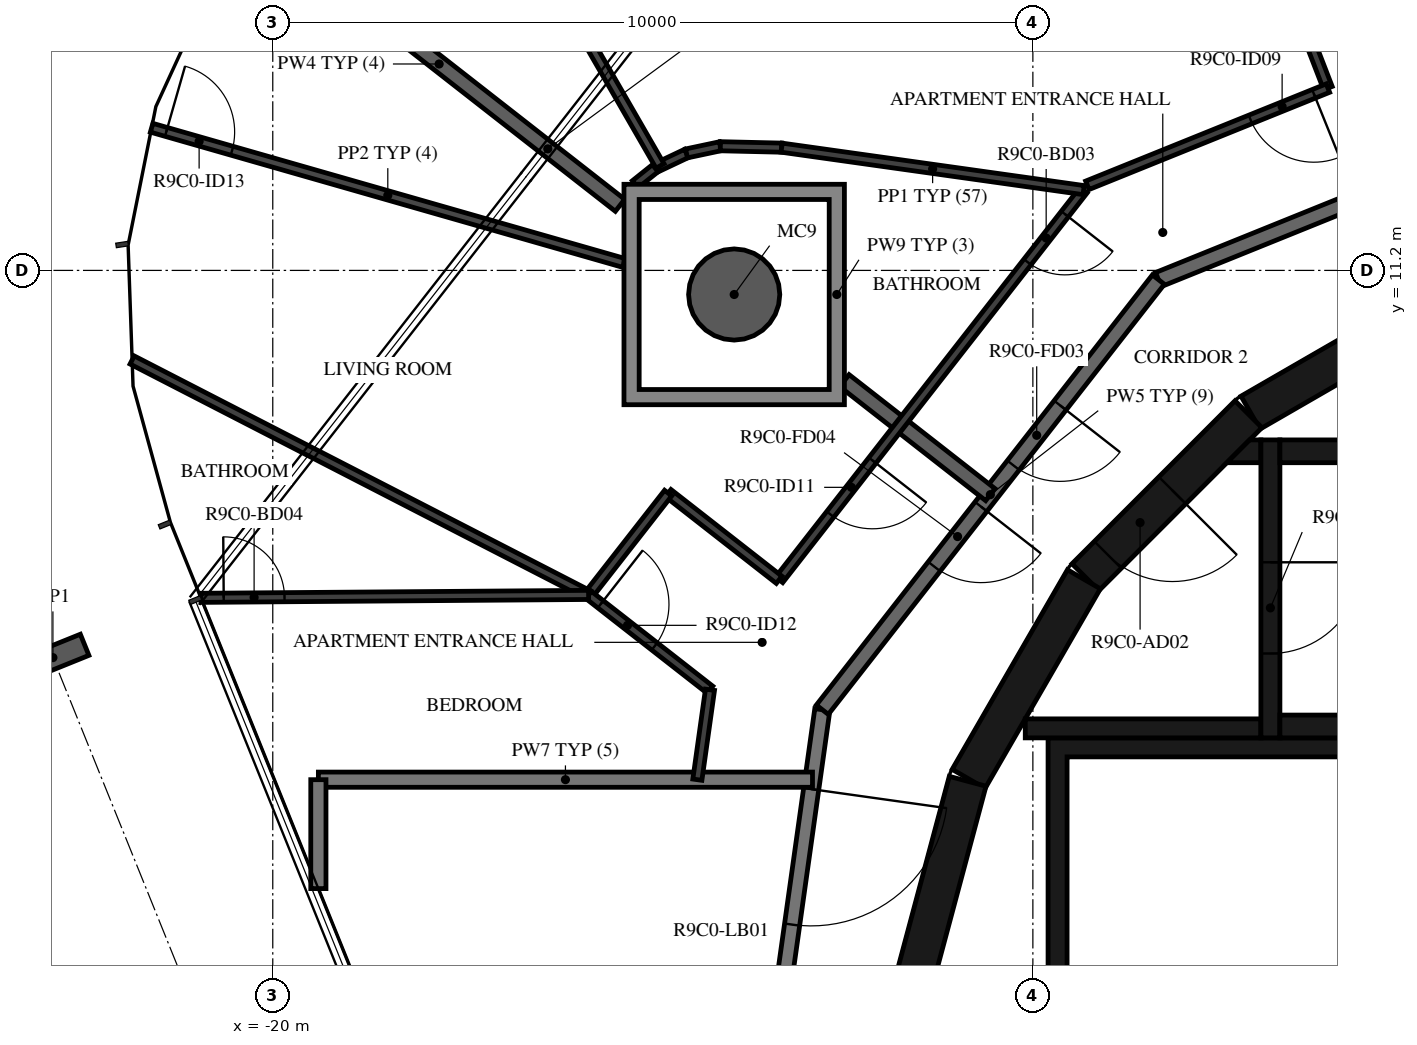
"""IFC4 building model, lengths in metres.
Left out: names, types, materials, properties, quantities, classifications, styles, units other than length and angle.
Written with IfcOpenShell. Run it as: python <this file> out.ifc"""

import sys

from ifc_helpers import new_model, si_unit, direction, frame, frame_2d, origin, origin_2d, place, context, subcontext, project, spatial, polyline, rectangle, hollow_circle, i_section, outline, extrude, element, fill, save


model = new_model("IFC4")
c1 = context("Model", 3, precision=1e-05, world=origin(), true_north=direction((0.0, 1.0)))
c2 = subcontext(c1, "Body", "Model", "MODEL_VIEW")
j1 = project(units=[si_unit("LENGTHUNIT", "METRE"), si_unit("PLANEANGLEUNIT", "RADIAN")], contexts=[c1])
p1 = place(None, origin())
s1 = spatial("IfcSite", under=j1, at=p1, CompositionType="ELEMENT")
p2 = place(p1, origin())
s2 = spatial("IfcBuilding", under=s1, at=p2, CompositionType="ELEMENT")
p3 = place(p2, frame((0.0, 0.0, 354.0)))
s3 = spatial("IfcBuildingStorey", under=s2, at=p3, CompositionType="ELEMENT", Elevation=354.0)
p4 = place(p3, frame((-13.929, 10.883, -0.38), z_axis=(0.0, 0.0, 1.0), x_axis=(1.0, 0.0, 0.0)))
e1 = element("IfcColumn", 1, at=p4, inside=s3, PredefinedType="COLUMN", context=c2, shape_type="SweptSolid", body=[
    extrude(hollow_circle(Radius=0.6, WallThickness=0.03, at=origin_2d()), origin(), (0.0, 0.0, 1.0), 3.5),
])
p5 = place(p3, frame((-22.893, 6.106, -0.38), z_axis=(0.0, 0.0, 1.0), x_axis=(-0.374606892434, 0.927183733755, 0.0)))
e2 = element("IfcColumn", 2, at=p5, inside=s3, PredefinedType="COLUMN", context=c2, shape_type="SweptSolid", body=[
    extrude(i_section(OverallWidth=0.3, OverallDepth=0.9, WebThickness=0.019, FlangeThickness=0.035, FilletRadius=0.03, at=origin_2d()), origin(), (0.0, 0.0, 1.0), 3.5),
])
p6 = place(p3, frame((-4.51, 10.845, 0.0), z_axis=(0.0, 0.0, 1.0), x_axis=(-0.865975092491, -0.500087131594, 0.0)))
e3 = element("IfcWall", 3, at=p6, inside=s3, PredefinedType="SHEAR", context=c2, shape_type="SweptSolid", body=[
    extrude(rectangle(XDim=3.033, YDim=0.5, at=frame_2d((1.516, 0.0))), origin(), (0.0, 0.0, 1.0), 3.12),
])
p7 = place(p3, frame((-7.164, 9.308, 0.0), z_axis=(0.0, 0.0, 1.0), x_axis=(-0.707106781187, -0.707106781187, 0.0)))
e4 = element("IfcWall", 4, at=p7, inside=s3, PredefinedType="SHEAR", context=c2, shape_type="SweptSolid", body=[
    extrude(rectangle(XDim=3.032, YDim=0.5, at=frame_2d((1.516, 0.0))), origin(), (0.0, 0.0, 1.0), 3.12),
])
p8 = place(p7, frame((1.416, 0.0, 0.0)))
e5 = element("IfcOpeningElement", 5, at=p8, cuts=e4, PredefinedType="OPENING", context=c2, shape_type="SweptSolid", body=[
    extrude(rectangle(XDim=1.2, YDim=2.1, at=frame_2d((0.6, 1.05))), frame((0.0, 0.26, 0.0), z_axis=(0.0, -1.0, 0.0), x_axis=(1.0, 0.0, 0.0)), (0.0, 0.0, 1.0), 0.52),
])
for number, where, z_axis, x_axis in (
    (6, (-9.329, 7.137, 0.0), (0.0, 0.0, 1.0), (-0.5, -0.866, 0.0)),
    (7, (-10.858, 4.479, 0.0), (0.0, 0.0, 1.0), (-0.259, -0.966, 0.0)),
):
    element("IfcWall", number, at=place(p3, frame(where, z_axis=z_axis, x_axis=x_axis)), inside=s3, PredefinedType="SHEAR", context=c2, shape_type="SweptSolid", body=[
        extrude(rectangle(XDim=3.033, YDim=0.5, at=frame_2d((1.516, 0.0))), origin(), (0.0, 0.0, 1.0), 3.12),
    ])
for number, where, z_axis, x_axis in (
    (8, (-6.75, 5.2, 0.0), (0.0, 0.0, 1.0), (1.0, 0.0, 0.0)),
    (9, (-6.75, 8.82, 0.0), (0.0, 0.0, 1.0), (1.0, 0.0, 0.0)),
):
    element("IfcWall", number, at=place(p3, frame(where, z_axis=z_axis, x_axis=x_axis)), inside=s3, PredefinedType="SHEAR", context=c2, shape_type="SweptSolid", body=[
        extrude(rectangle(XDim=6.75, YDim=0.3, at=frame_2d((3.375, 0.0))), origin(), (0.0, 0.0, 1.0), 3.12),
    ])
p9 = place(p3, frame((-6.875, 8.97, 0.0), z_axis=(0.0, 0.0, 1.0), x_axis=(0.0, -1.0, 0.0)))
e10 = element("IfcWall", 10, at=p9, inside=s3, PredefinedType="SHEAR", context=c2, shape_type="SweptSolid", body=[
    extrude(rectangle(XDim=3.92, YDim=0.25, at=frame_2d((1.96, 0.0))), origin(), (0.0, 0.0, 1.0), 3.12),
])
p10 = place(p9, frame((1.61, 0.0, 0.0)))
e11 = element("IfcOpeningElement", 11, at=p10, cuts=e10, PredefinedType="OPENING", context=c2, shape_type="SweptSolid", body=[
    extrude(rectangle(XDim=1.2, YDim=2.1, at=frame_2d((0.6, 1.05))), frame((0.0, 0.135, 0.0), z_axis=(0.0, -1.0, 0.0), x_axis=(1.0, 0.0, 0.0)), (0.0, 0.0, 1.0), 0.27),
])
p11 = place(p3, frame((-7.0, 5.175, 0.0), z_axis=(0.0, 0.0, 1.0), x_axis=(-1.0, 0.0, 0.0)))
e12 = element("IfcWall", 12, at=p11, inside=s3, PredefinedType="SHEAR", context=c2, shape_type="SweptSolid", body=[
    extrude(rectangle(XDim=3.1, YDim=0.25, at=frame_2d((1.55, 0.0))), origin(), (0.0, 0.0, 1.0), 3.12),
])
p12 = place(p3, origin())
e13 = element("IfcWall", 13, at=p12, inside=s3, PredefinedType="SHEAR", context=c2, shape_type="SweptSolid", body=[
    extrude(outline(polyline([(-7.148, 8.97), (-7.0, 8.97), (-7.0, 8.67), (-7.448, 8.67), (-7.148, 8.97)])), origin(), (0.0, 0.0, 1.0), 3.12),
])
p13 = place(p3, origin())
e14 = element("IfcWall", 14, at=p13, inside=s3, PredefinedType="SHEAR", context=c2, shape_type="SweptSolid", body=[
    extrude(outline(polyline([(-9.8, 1.9), (-9.55, 1.9), (-9.55, 4.8), (3.1, 4.8), (3.1, 1.9), (3.35, 1.9), (3.35, 4.8), (5.25, 4.8), (5.25, 1.9), (5.5, 1.9), (5.5, 4.8), (7.4, 4.8), (7.4, 1.9), (7.65, 1.9), (7.65, 4.8), (9.55, 4.8), (9.55, 1.9), (9.8, 1.9), (9.8, 4.8), (9.8, 5.05), (-9.8, 5.05), (-9.8, 4.8), (-9.8, 1.9)])), origin(), (0.0, 0.0, 1.0), 3.12),
])
p14 = place(p3, frame((-12.77, 5.42, 0.0), z_axis=(0.0, 0.0, 1.0), x_axis=(-0.139155334385, -0.990270565508, 0.0)))
e15 = element("IfcWall", 15, at=p14, inside=s3, PredefinedType="STANDARD", context=c2, shape_type="SweptSolid", body=[
    extrude(rectangle(XDim=7.181, YDim=0.2, at=frame_2d((3.59, 0.0))), origin(), (0.0, 0.0, 1.0), 3.12),
])
p15 = place(p14, frame((1.055, 0.0, 0.0)))
e16 = element("IfcOpeningElement", 16, at=p15, cuts=e15, PredefinedType="OPENING", context=c2, shape_type="SweptSolid", body=[
    extrude(rectangle(XDim=1.8, YDim=2.1, at=frame_2d((0.9, 1.05))), frame((0.0, 0.11, 0.0), z_axis=(0.0, -1.0, 0.0), x_axis=(1.0, 0.0, 0.0)), (0.0, 0.0, 1.0), 0.22),
])
p16 = place(p3, frame((-1.691, 13.769, 0.0), z_axis=(0.0, 0.0, 1.0), x_axis=(-0.92717916932, -0.374618189599, 0.0)))
e17 = element("IfcWall", 17, at=p16, inside=s3, PredefinedType="STANDARD", context=c2, shape_type="SweptSolid", body=[
    extrude(rectangle(XDim=7.181, YDim=0.2, at=frame_2d((3.591, 0.0))), origin(), (0.0, 0.0, 1.0), 3.12),
])
p17 = place(p3, frame((-8.349, 11.079, 0.0), z_axis=(0.0, 0.0, 1.0), x_axis=(-0.615669112324, -0.78800478687, 0.0)))
e18 = element("IfcWall", 18, at=p17, inside=s3, PredefinedType="STANDARD", context=c2, shape_type="SweptSolid", body=[
    extrude(rectangle(XDim=7.181, YDim=0.2, at=frame_2d((3.591, 0.0))), origin(), (0.0, 0.0, 1.0), 3.12),
])
p18 = place(p17, frame((2.1, 0.0, 0.0)))
e19 = element("IfcOpeningElement", 19, at=p18, cuts=e18, PredefinedType="OPENING", context=c2, shape_type="SweptSolid", body=[
    extrude(rectangle(XDim=1.0, YDim=2.1, at=frame_2d((0.5, 1.05))), frame((0.0, 0.11, 0.0), z_axis=(0.0, -1.0, 0.0), x_axis=(1.0, 0.0, 0.0)), (0.0, 0.0, 1.0), 0.22),
])
p19 = place(p17, frame((3.79, 0.0, 0.0)))
e20 = element("IfcOpeningElement", 20, at=p19, cuts=e18, PredefinedType="OPENING", context=c2, shape_type="SweptSolid", body=[
    extrude(rectangle(XDim=1.0, YDim=2.1, at=frame_2d((0.5, 1.05))), frame((0.0, 0.11, 0.0), z_axis=(0.0, -1.0, 0.0), x_axis=(1.0, 0.0, 0.0)), (0.0, 0.0, 1.0), 0.22),
])
p20 = place(p3, frame((-12.899, 4.5, 0.0), z_axis=(0.0, 0.0, 1.0), x_axis=(-1.0, 0.0, 0.0)))
e21 = element("IfcWall", 21, at=p20, inside=s3, PredefinedType="STANDARD", context=c2, shape_type="SweptSolid", body=[
    extrude(rectangle(XDim=6.5, YDim=0.2, at=frame_2d((3.25, 0.0))), origin(), (0.0, 0.0, 1.0), 3.12),
])
p21 = place(p3, frame((-19.4, 4.5, 0.0), z_axis=(0.0, 0.0, 1.0), x_axis=(0.0, -1.0, 0.0)))
e22 = element("IfcWall", 22, at=p21, inside=s3, PredefinedType="STANDARD", context=c2, shape_type="SweptSolid", body=[
    extrude(rectangle(XDim=1.433, YDim=0.2, at=frame_2d((0.716, 0.0))), origin(), (0.0, 0.0, 1.0), 3.12),
])
p22 = place(p3, frame((-12.479, 9.75, 0.0), z_axis=(0.0, 0.0, 1.0), x_axis=(0.788050197026, -0.615610986717, 0.0)))
e23 = element("IfcWall", 23, at=p22, inside=s3, PredefinedType="STANDARD", context=c2, shape_type="SweptSolid", body=[
    extrude(rectangle(XDim=2.437, YDim=0.2, at=frame_2d((1.218, 0.0))), origin(), (0.0, 0.0, 1.0), 3.12),
])
p23 = place(p3, frame((-20.191, 15.775, 0.0), z_axis=(0.0, 0.0, 1.0), x_axis=(0.788013955741, -0.615657376758, 0.0)))
e24 = element("IfcWall", 24, at=p23, inside=s3, PredefinedType="STANDARD", context=c2, shape_type="SweptSolid", body=[
    extrude(rectangle(XDim=6.04, YDim=0.2, at=frame_2d((3.02, 0.0))), origin(), (0.0, 0.0, 1.0), 3.12),
])
p24 = place(p3, frame((-6.506, 14.601, 0.0), z_axis=(0.0, 0.0, 1.0), x_axis=(0.36075842677, -0.932659293373, 0.0)))
e25 = element("IfcWall", 25, at=p24, inside=s3, PredefinedType="PARTITIONING", context=c2, shape_type="SweptSolid", body=[
    extrude(rectangle(XDim=1.075, YDim=0.12, at=frame_2d((0.538, 0.0))), origin(), (0.0, 0.0, 1.0), 3.12),
])
p25 = place(p3, frame((-6.118, 13.598, 0.0), z_axis=(0.0, 0.0, 1.0), x_axis=(-0.927163982911, -0.374655773735, 0.0)))
e26 = element("IfcWall", 26, at=p25, inside=s3, PredefinedType="PARTITIONING", context=c2, shape_type="SweptSolid", body=[
    extrude(rectangle(XDim=3.414, YDim=0.12, at=frame_2d((1.707, 0.0))), origin(), (0.0, 0.0, 1.0), 3.12),
])
p26 = place(p25, frame((0.2, 0.0, 0.0)))
e27 = element("IfcOpeningElement", 27, at=p26, cuts=e26, PredefinedType="OPENING", context=c2, shape_type="SweptSolid", body=[
    extrude(rectangle(XDim=0.9, YDim=2.1, at=frame_2d((0.45, 1.05))), frame((0.0, 0.07, 0.0), z_axis=(0.0, -1.0, 0.0), x_axis=(1.0, 0.0, 0.0)), (0.0, 0.0, 1.0), 0.14),
])
p27 = place(p3, frame((-9.333, 12.257, 0.0), z_axis=(0.0, 0.0, 1.0), x_axis=(-0.615643313808, -0.788024942602, 0.0)))
e28 = element("IfcWall", 28, at=p27, inside=s3, PredefinedType="PARTITIONING", context=c2, shape_type="SweptSolid", body=[
    extrude(rectangle(XDim=6.506, YDim=0.12, at=frame_2d((3.253, 0.0))), origin(), (0.0, 0.0, 1.0), 3.12),
])
p28 = place(p27, frame((0.4, 0.0, 0.0)))
e29 = element("IfcOpeningElement", 29, at=p28, cuts=e28, PredefinedType="OPENING", context=c2, shape_type="SweptSolid", body=[
    extrude(rectangle(XDim=0.8, YDim=2.1, at=frame_2d((0.4, 1.05))), frame((0.0, 0.07, 0.0), z_axis=(0.0, -1.0, 0.0), x_axis=(1.0, 0.0, 0.0)), (0.0, 0.0, 1.0), 0.14),
])
p29 = place(p27, frame((4.512, 0.0, 0.0)))
e30 = element("IfcOpeningElement", 30, at=p29, cuts=e28, PredefinedType="OPENING", context=c2, shape_type="SweptSolid", body=[
    extrude(rectangle(XDim=0.9, YDim=2.1, at=frame_2d((0.45, 1.05))), frame((0.0, 0.07, 0.0), z_axis=(0.0, -1.0, 0.0), x_axis=(1.0, 0.0, 0.0)), (0.0, 0.0, 1.0), 0.14),
])
p30 = place(p3, frame((-14.941, 12.557, 0.0), z_axis=(0.0, 0.0, 1.0), x_axis=(0.903749522455, 0.428061678572, 0.0)))
e31 = element("IfcWall", 31, at=p30, inside=s3, PredefinedType="PARTITIONING", context=c2, shape_type="SweptSolid", body=[
    extrude(rectangle(XDim=0.426, YDim=0.12, at=frame_2d((0.213, 0.0))), origin(), (0.0, 0.0, 1.0), 3.12),
])
p31 = place(p3, frame((-14.557, 12.739, 0.0), z_axis=(0.0, 0.0, 1.0), x_axis=(0.978201106396, 0.207659807008, 0.0)))
e32 = element("IfcWall", 32, at=p31, inside=s3, PredefinedType="PARTITIONING", context=c2, shape_type="SweptSolid", body=[
    extrude(rectangle(XDim=0.455, YDim=0.12, at=frame_2d((0.228, 0.0))), origin(), (0.0, 0.0, 1.0), 3.12),
])
p32 = place(p3, frame((-14.112, 12.833, 0.0), z_axis=(0.0, 0.0, 1.0), x_axis=(0.999735389157, -0.023003296874, 0.0)))
e33 = element("IfcWall", 33, at=p32, inside=s3, PredefinedType="PARTITIONING", context=c2, shape_type="SweptSolid", body=[
    extrude(rectangle(XDim=0.807, YDim=0.12, at=frame_2d((0.403, 0.0))), origin(), (0.0, 0.0, 1.0), 3.12),
])
p33 = place(p3, frame((-13.305, 12.815, 0.0), z_axis=(0.0, 0.0, 1.0), x_axis=(0.990267066123, -0.139180234773, 0.0)))
e34 = element("IfcWall", 34, at=p33, inside=s3, PredefinedType="PARTITIONING", context=c2, shape_type="SweptSolid", body=[
    extrude(rectangle(XDim=4.012, YDim=0.12, at=frame_2d((2.006, 0.0))), origin(), (0.0, 0.0, 1.0), 3.12),
])
p34 = place(p3, frame((-17.912, 17.789, 0.0), z_axis=(0.0, 0.0, 1.0), x_axis=(0.499615949423, -0.866247021976, 0.0)))
e35 = element("IfcWall", 35, at=p34, inside=s3, PredefinedType="PARTITIONING", context=c2, shape_type="SweptSolid", body=[
    extrude(rectangle(XDim=6.02, YDim=0.12, at=frame_2d((3.01, 0.0))), origin(), (0.0, 0.0, 1.0), 2.73),
])
p35 = place(p34, frame((0.2, 0.0, 0.0)))
e36 = element("IfcOpeningElement", 36, at=p35, cuts=e35, PredefinedType="OPENING", context=c2, shape_type="SweptSolid", body=[
    extrude(rectangle(XDim=0.9, YDim=2.1, at=frame_2d((0.45, 1.05))), frame((0.0, 0.07, 0.0), z_axis=(0.0, -1.0, 0.0), x_axis=(1.0, 0.0, 0.0)), (0.0, 0.0, 1.0), 0.14),
])
p36 = place(p3, frame((-14.968, 12.544, 0.0), z_axis=(0.0, 0.0, 1.0), x_axis=(-0.780727997402, -0.62487102195, 0.0)))
e37 = element("IfcWall", 37, at=p36, inside=s3, PredefinedType="PARTITIONING", context=c2, shape_type="SweptSolid", body=[
    extrude(rectangle(XDim=0.338, YDim=0.12, at=frame_2d((0.169, 0.0))), origin(), (0.0, 0.0, 1.0), 3.12),
])
p37 = place(p3, frame((-13.338, 7.129, 0.0), z_axis=(0.0, 0.0, 1.0), x_axis=(-0.787938483233, 0.615753965997, 0.0)))
e38 = element("IfcWall", 38, at=p37, inside=s3, PredefinedType="PARTITIONING", context=c2, shape_type="SweptSolid", body=[
    extrude(rectangle(XDim=1.853, YDim=0.12, at=frame_2d((0.927, 0.0))), origin(), (0.0, 0.0, 1.0), 3.12),
])
p38 = place(p3, frame((-14.798, 8.271, 0.0), z_axis=(0.0, 0.0, 1.0), x_axis=(-0.615669123866, -0.788004777852, 0.0)))
e39 = element("IfcWall", 39, at=p38, inside=s3, PredefinedType="PARTITIONING", context=c2, shape_type="SweptSolid", body=[
    extrude(rectangle(XDim=1.7, YDim=0.12, at=frame_2d((0.85, 0.0))), origin(), (0.0, 0.0, 1.0), 3.12),
])
p39 = place(p3, frame((-15.845, 6.931, 0.0), z_axis=(0.0, 0.0, 1.0), x_axis=(0.787962283792, -0.615723508827, 0.0)))
e40 = element("IfcWall", 40, at=p39, inside=s3, PredefinedType="PARTITIONING", context=c2, shape_type="SweptSolid", body=[
    extrude(rectangle(XDim=2.027, YDim=0.12, at=frame_2d((1.013, 0.0))), origin(), (0.0, 0.0, 1.0), 3.12),
])
p40 = place(p39, frame((0.2, 0.0, 0.0)))
e41 = element("IfcOpeningElement", 41, at=p40, cuts=e40, PredefinedType="OPENING", context=c2, shape_type="SweptSolid", body=[
    extrude(rectangle(XDim=0.9, YDim=2.1, at=frame_2d((0.45, 1.05))), frame((0.0, 0.07, 0.0), z_axis=(0.0, -1.0, 0.0), x_axis=(1.0, 0.0, 0.0)), (0.0, 0.0, 1.0), 0.14),
])
p41 = place(p3, frame((-14.248, 5.683, 0.0), z_axis=(0.0, 0.0, 1.0), x_axis=(-0.139189066398, -0.990265824814, 0.0)))
e42 = element("IfcWall", 42, at=p41, inside=s3, PredefinedType="PARTITIONING", context=c2, shape_type="SweptSolid", body=[
    extrude(rectangle(XDim=1.195, YDim=0.12, at=frame_2d((0.597, 0.0))), origin(), (0.0, 0.0, 1.0), 3.12),
])
p42 = place(p3, frame((-21.594, 13.077, 0.0), z_axis=(0.0, 0.0, 1.0), x_axis=(0.961389857774, -0.275190009576, 0.0)))
e43 = element("IfcWall", 43, at=p42, inside=s3, PredefinedType="PARTITIONING", context=c2, shape_type="SweptSolid", body=[
    extrude(rectangle(XDim=6.464, YDim=0.12, at=frame_2d((3.232, 0.0))), origin(), (0.0, 0.0, 1.0), 2.73),
])
p43 = place(p42, frame((0.2, 0.0, 0.0)))
e44 = element("IfcOpeningElement", 44, at=p43, cuts=e43, PredefinedType="OPENING", context=c2, shape_type="SweptSolid", body=[
    extrude(rectangle(XDim=0.9, YDim=2.1, at=frame_2d((0.45, 1.05))), frame((0.0, 0.07, 0.0), z_axis=(0.0, -1.0, 0.0), x_axis=(1.0, 0.0, 0.0)), (0.0, 0.0, 1.0), 0.14),
])
p44 = place(p3, frame((-21.85, 10.021, 0.0), z_axis=(0.0, 0.0, 1.0), x_axis=(0.889153763622, -0.457608549567, 0.0)))
e45 = element("IfcWall", 45, at=p44, inside=s3, PredefinedType="PARTITIONING", context=c2, shape_type="SweptSolid", body=[
    extrude(rectangle(XDim=6.754, YDim=0.12, at=frame_2d((3.377, 0.0))), origin(), (0.0, 0.0, 1.0), 3.12),
])
p45 = place(p3, frame((-20.946, 6.892, 0.0), z_axis=(0.0, 0.0, 1.0), x_axis=(0.999971403985, 0.007562487164, 0.0)))
e46 = element("IfcWall", 46, at=p45, inside=s3, PredefinedType="PARTITIONING", context=c2, shape_type="SweptSolid", body=[
    extrude(rectangle(XDim=5.101, YDim=0.12, at=frame_2d((2.55, 0.0))), origin(), (0.0, 0.0, 1.0), 3.12),
])
p46 = place(p45, frame((0.3, 0.0, 0.0)))
e47 = element("IfcOpeningElement", 47, at=p46, cuts=e46, PredefinedType="OPENING", context=c2, shape_type="SweptSolid", body=[
    extrude(rectangle(XDim=0.8, YDim=2.1, at=frame_2d((0.4, 1.05))), frame((0.0, 0.07, 0.0), z_axis=(0.0, -1.0, 0.0), x_axis=(1.0, 0.0, 0.0)), (0.0, 0.0, 1.0), 0.14),
])
p47 = place(p3, origin())
e48 = element("IfcWall", 48, at=p47, inside=s3, PredefinedType="STANDARD", context=c2, shape_type="SweptSolid", body=[
    extrude(outline(polyline([(-12.479, 12.333), (-12.479, 9.433), (-15.379, 9.433), (-15.379, 12.333), (-12.479, 12.333)]), holes=[polyline([(-15.179, 9.633), (-12.679, 9.633), (-12.679, 12.133), (-15.179, 12.133), (-15.179, 9.633)])]), origin(), (0.0, 0.0, 1.0), 3.12),
])
p48 = place(p10, origin())
e49 = element("IfcDoor", 49, at=p48, inside=s3, OperationType="SINGLE_SWING_LEFT", PredefinedType="DOOR", context=c2, shape_type="SweptSolid", body=[
    extrude(rectangle(XDim=1.2, YDim=2.1, at=frame_2d((0.6, 1.05))), frame((0.0, 0.025, 0.0), z_axis=(0.0, -1.0, 0.0), x_axis=(1.0, 0.0, 0.0)), (0.0, 0.0, 1.0), 0.05),
])
fill(e11, e49)
p49 = place(p8, origin())
e50 = element("IfcDoor", 50, at=p49, inside=s3, OperationType="SINGLE_SWING_RIGHT", PredefinedType="DOOR", context=c2, shape_type="SweptSolid", body=[
    extrude(rectangle(XDim=1.2, YDim=2.1, at=frame_2d((0.6, 1.05))), frame((0.0, 0.025, 0.0), z_axis=(0.0, -1.0, 0.0), x_axis=(1.0, 0.0, 0.0)), (0.0, 0.0, 1.0), 0.05),
])
fill(e5, e50)
p50 = place(p18, origin())
e51 = element("IfcDoor", 51, at=p50, inside=s3, OperationType="SINGLE_SWING_RIGHT", PredefinedType="DOOR", context=c2, shape_type="SweptSolid", body=[
    extrude(rectangle(XDim=1.0, YDim=2.1, at=frame_2d((0.5, 1.05))), frame((0.0, 0.025, 0.0), z_axis=(0.0, -1.0, 0.0), x_axis=(1.0, 0.0, 0.0)), (0.0, 0.0, 1.0), 0.05),
])
fill(e19, e51)
p51 = place(p26, origin())
e52 = element("IfcDoor", 52, at=p51, inside=s3, OperationType="SINGLE_SWING_RIGHT", PredefinedType="DOOR", context=c2, shape_type="SweptSolid", body=[
    extrude(rectangle(XDim=0.9, YDim=2.1, at=frame_2d((0.45, 1.05))), frame((0.0, 0.025, 0.0), z_axis=(0.0, -1.0, 0.0), x_axis=(1.0, 0.0, 0.0)), (0.0, 0.0, 1.0), 0.05),
])
fill(e27, e52)
p52 = place(p28, origin())
e53 = element("IfcDoor", 53, at=p52, inside=s3, OperationType="SINGLE_SWING_RIGHT", PredefinedType="DOOR", context=c2, shape_type="SweptSolid", body=[
    extrude(rectangle(XDim=0.8, YDim=2.1, at=frame_2d((0.4, 1.05))), frame((0.0, 0.025, 0.0), z_axis=(0.0, -1.0, 0.0), x_axis=(1.0, 0.0, 0.0)), (0.0, 0.0, 1.0), 0.05),
])
fill(e29, e53)
p53 = place(p19, origin())
e54 = element("IfcDoor", 54, at=p53, inside=s3, OperationType="SINGLE_SWING_LEFT", PredefinedType="DOOR", context=c2, shape_type="SweptSolid", body=[
    extrude(rectangle(XDim=1.0, YDim=2.1, at=frame_2d((0.5, 1.05))), frame((0.0, 0.025, 0.0), z_axis=(0.0, -1.0, 0.0), x_axis=(1.0, 0.0, 0.0)), (0.0, 0.0, 1.0), 0.05),
])
fill(e20, e54)
p54 = place(p29, origin())
e55 = element("IfcDoor", 55, at=p54, inside=s3, OperationType="SINGLE_SWING_LEFT", PredefinedType="DOOR", context=c2, shape_type="SweptSolid", body=[
    extrude(rectangle(XDim=0.9, YDim=2.1, at=frame_2d((0.45, 1.05))), frame((0.0, 0.025, 0.0), z_axis=(0.0, -1.0, 0.0), x_axis=(1.0, 0.0, 0.0)), (0.0, 0.0, 1.0), 0.05),
])
fill(e30, e55)
p55 = place(p40, origin())
e56 = element("IfcDoor", 56, at=p55, inside=s3, OperationType="SINGLE_SWING_LEFT", PredefinedType="DOOR", context=c2, shape_type="SweptSolid", body=[
    extrude(rectangle(XDim=0.9, YDim=2.1, at=frame_2d((0.45, 1.05))), frame((0.0, 0.025, 0.0), z_axis=(0.0, -1.0, 0.0), x_axis=(1.0, 0.0, 0.0)), (0.0, 0.0, 1.0), 0.05),
])
fill(e41, e56)
p56 = place(p43, origin())
e57 = element("IfcDoor", 57, at=p56, inside=s3, OperationType="SINGLE_SWING_LEFT", PredefinedType="DOOR", context=c2, shape_type="SweptSolid", body=[
    extrude(rectangle(XDim=0.9, YDim=2.1, at=frame_2d((0.45, 1.05))), frame((0.0, 0.025, 0.0), z_axis=(0.0, -1.0, 0.0), x_axis=(1.0, 0.0, 0.0)), (0.0, 0.0, 1.0), 0.05),
])
fill(e44, e57)
p57 = place(p46, origin())
e58 = element("IfcDoor", 58, at=p57, inside=s3, OperationType="SINGLE_SWING_LEFT", PredefinedType="DOOR", context=c2, shape_type="SweptSolid", body=[
    extrude(rectangle(XDim=0.8, YDim=2.1, at=frame_2d((0.4, 1.05))), frame((0.0, 0.025, 0.0), z_axis=(0.0, -1.0, 0.0), x_axis=(1.0, 0.0, 0.0)), (0.0, 0.0, 1.0), 0.05),
])
fill(e47, e58)
p58 = place(p15, origin())
e59 = element("IfcDoor", 59, at=p58, inside=s3, OperationType="DOUBLE_DOOR_SINGLE_SWING", PredefinedType="DOOR", context=c2, shape_type="SweptSolid", body=[
    extrude(rectangle(XDim=1.8, YDim=2.1, at=frame_2d((0.9, 1.05))), frame((0.0, 0.025, 0.0), z_axis=(0.0, -1.0, 0.0), x_axis=(1.0, 0.0, 0.0)), (0.0, 0.0, 1.0), 0.05),
])
fill(e16, e59)
save(model, sys.argv[1])
